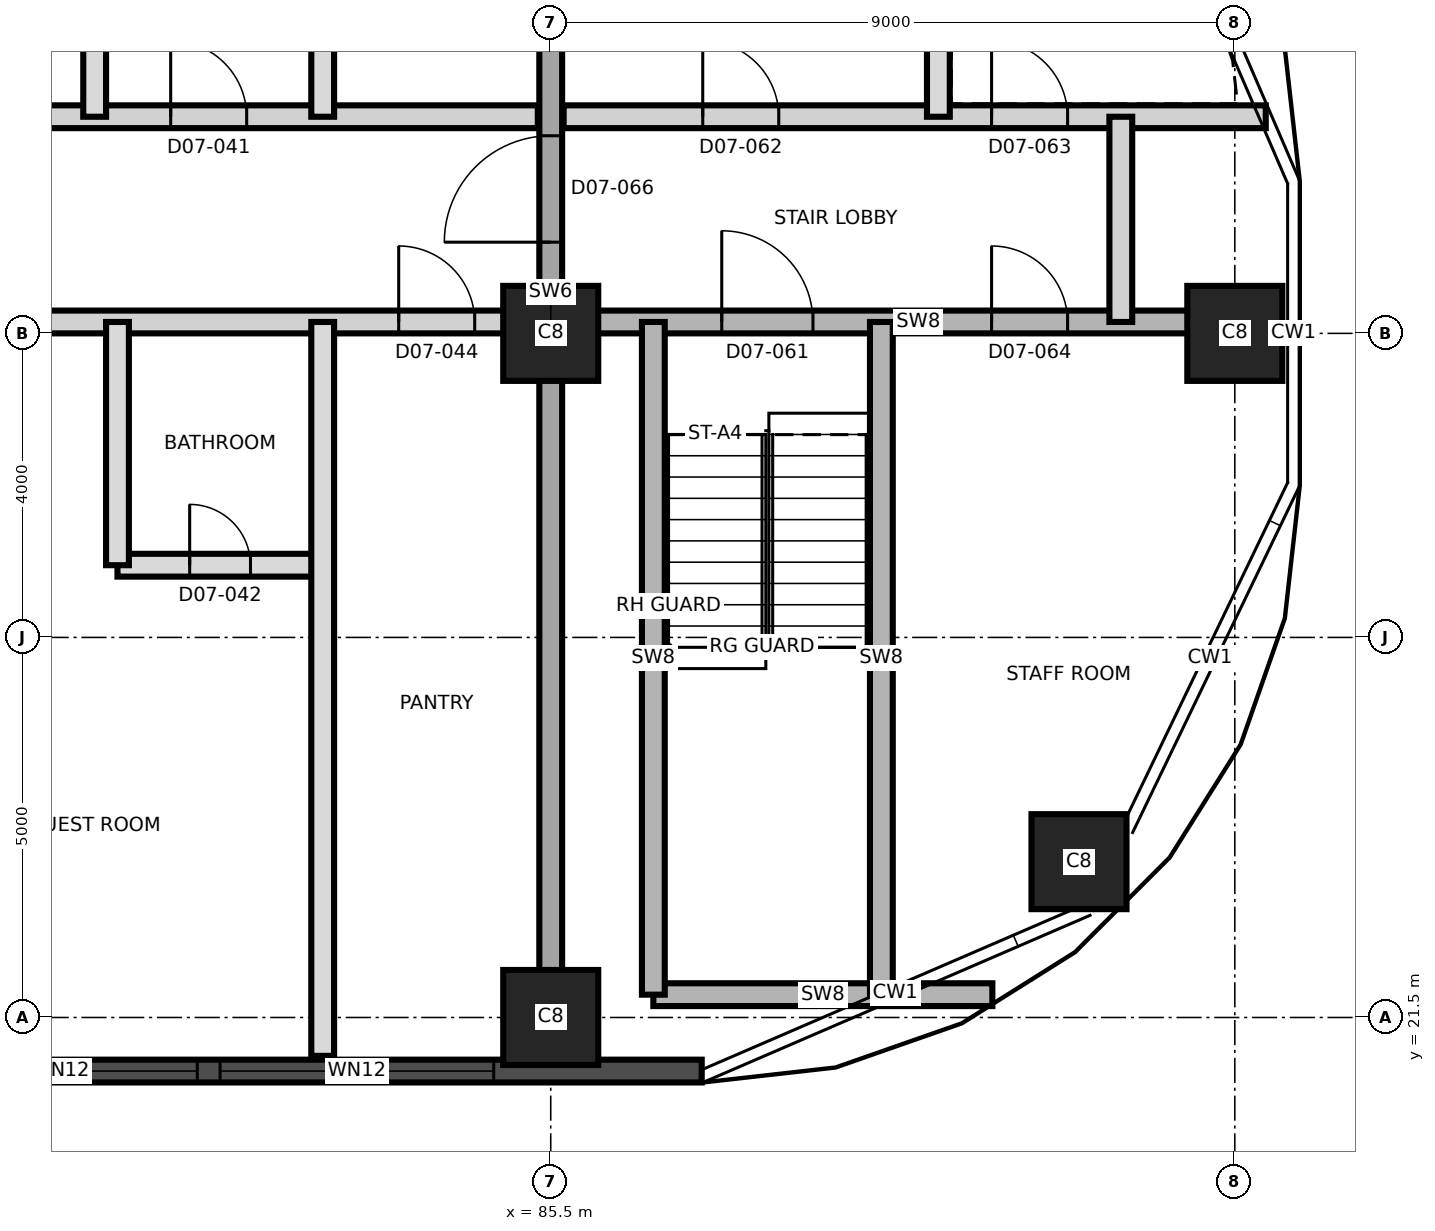
"""IFC4 building model, lengths in metres.
Left out: names, types, materials, properties, quantities, classifications, styles, units other than length and angle.
Written with IfcOpenShell. Run it as: python <this file> out.ifc"""

import sys

from ifc_helpers import new_model, si_unit, direction, frame, frame_2d, origin, origin_2d, place, context, subcontext, project, spatial, rectangle, extrude, element, fill, save


model = new_model("IFC4")
c1 = context("Model", 3, precision=1e-05, world=origin(), true_north=direction((0.0, 1.0)))
c2 = subcontext(c1, "Body", "Model", "MODEL_VIEW")
j1 = project(units=[si_unit("LENGTHUNIT", "METRE"), si_unit("PLANEANGLEUNIT", "RADIAN")], contexts=[c1])
p1 = place(None, origin())
s1 = spatial("IfcSite", under=j1, at=p1, CompositionType="ELEMENT")
p2 = place(p1, origin())
s2 = spatial("IfcBuilding", under=s1, at=p2, CompositionType="ELEMENT")
p3 = place(p2, frame((0.0, 0.0, 90.8)))
s3 = spatial("IfcBuildingStorey", under=s2, at=p3, CompositionType="ELEMENT", Elevation=90.8)
for number, where, z_axis, x_axis in (
    (1, (85.5, 21.5, 0.0), (0.0, 0.0, 1.0), (1.0, 0.0, 0.0)),
    (2, (92.45, 23.55, 0.0), (0.0, 0.0, 1.0), (1.0, 0.0, 0.0)),
    (3, (85.5, 30.5, 0.0), (0.0, 0.0, 1.0), (1.0, 0.0, 0.0)),
    (4, (94.5, 30.5, 0.0), (0.0, 0.0, 1.0), (1.0, 0.0, 0.0)),
):
    element("IfcColumn", number, at=place(p3, frame(where, z_axis=z_axis, x_axis=x_axis)), inside=s3, PredefinedType="COLUMN", context=c2, shape_type="SweptSolid", body=[
        extrude(rectangle(XDim=1.25, YDim=1.25, at=origin_2d()), origin(), (0.0, 0.0, 1.0), 3.7),
    ])
p4 = place(p3, frame((85.5, 20.995, 0.0), z_axis=(0.0, 0.0, 1.0), x_axis=(0.0, 1.0, 0.0)))
e5 = element("IfcWall", 5, at=p4, inside=s3, PredefinedType="SHEAR", context=c2, shape_type="SweptSolid", body=[
    extrude(rectangle(XDim=19.01, YDim=0.3, at=frame_2d((9.505, 0.0))), origin(), (0.0, 0.0, 1.0), 3.7),
])
p5 = place(p4, frame((10.705, 0.0, 0.0)))
e6 = element("IfcOpeningElement", 6, at=p5, cuts=e5, PredefinedType="OPENING", context=c2, shape_type="SweptSolid", body=[
    extrude(rectangle(XDim=1.4, YDim=2.1, at=frame_2d((0.7, 1.05))), frame((0.0, 0.16, 0.0), z_axis=(0.0, -1.0, 0.0), x_axis=(1.0, 0.0, 0.0)), (0.0, 0.0, 1.0), 0.32),
])
p6 = place(p3, frame((44.011, 20.795, 0.0), z_axis=(0.0, 0.0, 1.0), x_axis=(1.0, 0.0, 0.0)))
e7 = element("IfcWall", 7, at=p6, inside=s3, PredefinedType="SOLIDWALL", context=c2, shape_type="SweptSolid", body=[
    extrude(rectangle(XDim=43.476, YDim=0.3, at=frame_2d((21.738, 0.0))), origin(), (0.0, 0.0, 1.0), 3.4),
])
p7 = place(p6, frame((1.845, 0.0, 0.3)))
e8 = element("IfcOpeningElement", 8, at=p7, cuts=e7, PredefinedType="OPENING", context=c2, shape_type="SweptSolid", body=[
    extrude(rectangle(XDim=1.8, YDim=2.4, at=frame_2d((0.9, 1.2))), frame((0.0, 0.16, 0.0), z_axis=(0.0, -1.0, 0.0), x_axis=(1.0, 0.0, 0.0)), (0.0, 0.0, 1.0), 0.32),
])
p8 = place(p6, frame((5.639, 0.0, 0.9)))
e9 = element("IfcOpeningElement", 9, at=p8, cuts=e7, PredefinedType="OPENING", context=c2, shape_type="SweptSolid", body=[
    extrude(rectangle(XDim=4.2, YDim=1.5, at=frame_2d((2.1, 0.75))), frame((0.0, 0.16, 0.0), z_axis=(0.0, -1.0, 0.0), x_axis=(1.0, 0.0, 0.0)), (0.0, 0.0, 1.0), 0.32),
])
p9 = place(p6, frame((10.139, 0.0, 0.9)))
e10 = element("IfcOpeningElement", 10, at=p9, cuts=e7, PredefinedType="OPENING", context=c2, shape_type="SweptSolid", body=[
    extrude(rectangle(XDim=4.2, YDim=1.5, at=frame_2d((2.1, 0.75))), frame((0.0, 0.16, 0.0), z_axis=(0.0, -1.0, 0.0), x_axis=(1.0, 0.0, 0.0)), (0.0, 0.0, 1.0), 0.32),
])
p10 = place(p6, frame((14.639, 0.0, 0.9)))
e11 = element("IfcOpeningElement", 11, at=p10, cuts=e7, PredefinedType="OPENING", context=c2, shape_type="SweptSolid", body=[
    extrude(rectangle(XDim=4.2, YDim=1.5, at=frame_2d((2.1, 0.75))), frame((0.0, 0.16, 0.0), z_axis=(0.0, -1.0, 0.0), x_axis=(1.0, 0.0, 0.0)), (0.0, 0.0, 1.0), 0.32),
])
p11 = place(p6, frame((19.139, 0.0, 0.9)))
e12 = element("IfcOpeningElement", 12, at=p11, cuts=e7, PredefinedType="OPENING", context=c2, shape_type="SweptSolid", body=[
    extrude(rectangle(XDim=3.6, YDim=1.5, at=frame_2d((1.8, 0.75))), frame((0.0, 0.16, 0.0), z_axis=(0.0, -1.0, 0.0), x_axis=(1.0, 0.0, 0.0)), (0.0, 0.0, 1.0), 0.32),
])
p12 = place(p6, frame((24.239, 0.0, 0.9)))
e13 = element("IfcOpeningElement", 13, at=p12, cuts=e7, PredefinedType="OPENING", context=c2, shape_type="SweptSolid", body=[
    extrude(rectangle(XDim=3.6, YDim=1.5, at=frame_2d((1.8, 0.75))), frame((0.0, 0.16, 0.0), z_axis=(0.0, -1.0, 0.0), x_axis=(1.0, 0.0, 0.0)), (0.0, 0.0, 1.0), 0.32),
])
p13 = place(p6, frame((28.139, 0.0, 0.9)))
e14 = element("IfcOpeningElement", 14, at=p13, cuts=e7, PredefinedType="OPENING", context=c2, shape_type="SweptSolid", body=[
    extrude(rectangle(XDim=3.6, YDim=1.5, at=frame_2d((1.8, 0.75))), frame((0.0, 0.16, 0.0), z_axis=(0.0, -1.0, 0.0), x_axis=(1.0, 0.0, 0.0)), (0.0, 0.0, 1.0), 0.32),
])
p14 = place(p6, frame((33.239, 0.0, 0.9)))
e15 = element("IfcOpeningElement", 15, at=p14, cuts=e7, PredefinedType="OPENING", context=c2, shape_type="SweptSolid", body=[
    extrude(rectangle(XDim=3.6, YDim=1.5, at=frame_2d((1.8, 0.75))), frame((0.0, 0.16, 0.0), z_axis=(0.0, -1.0, 0.0), x_axis=(1.0, 0.0, 0.0)), (0.0, 0.0, 1.0), 0.32),
])
p15 = place(p6, frame((37.139, 0.0, 0.9)))
e16 = element("IfcOpeningElement", 16, at=p15, cuts=e7, PredefinedType="OPENING", context=c2, shape_type="SweptSolid", body=[
    extrude(rectangle(XDim=3.6, YDim=1.5, at=frame_2d((1.8, 0.75))), frame((0.0, 0.16, 0.0), z_axis=(0.0, -1.0, 0.0), x_axis=(1.0, 0.0, 0.0)), (0.0, 0.0, 1.0), 0.32),
])
p16 = place(p3, frame((86.85, 21.8, 0.0), z_axis=(0.0, 0.0, 1.0), x_axis=(1.0, 0.0, 0.0)))
e17 = element("IfcWall", 17, at=p16, inside=s3, PredefinedType="SHEAR", context=c2, shape_type="SweptSolid", body=[
    extrude(rectangle(XDim=4.46, YDim=0.3, at=frame_2d((2.23, 0.0))), origin(), (0.0, 0.0, 1.0), 3.4),
])
p17 = place(p3, frame((79.8, 27.45, 0.0), z_axis=(0.0, 0.0, 1.0), x_axis=(1.0, 0.0, 0.0)))
e18 = element("IfcWall", 18, at=p17, inside=s3, PredefinedType="PARTITIONING", context=c2, shape_type="SweptSolid", body=[
    extrude(rectangle(XDim=2.7, YDim=0.3, at=frame_2d((1.35, 0.0))), origin(), (0.0, 0.0, 1.0), 3.4),
])
p18 = place(p17, frame((0.95, 0.0, 0.0)))
e19 = element("IfcOpeningElement", 19, at=p18, cuts=e18, PredefinedType="OPENING", context=c2, shape_type="SweptSolid", body=[
    extrude(rectangle(XDim=0.8, YDim=2.1, at=frame_2d((0.4, 1.05))), frame((0.0, 0.16, 0.0), z_axis=(0.0, -1.0, 0.0), x_axis=(1.0, 0.0, 0.0)), (0.0, 0.0, 1.0), 0.32),
])
p19 = place(p3, frame((58.8, 30.65, 0.0), z_axis=(0.0, 0.0, 1.0), x_axis=(1.0, 0.0, 0.0)))
e20 = element("IfcWall", 20, at=p19, inside=s3, PredefinedType="PARTITIONING", context=c2, shape_type="SweptSolid", body=[
    extrude(rectangle(XDim=26.53, YDim=0.3, at=frame_2d((13.265, 0.0))), origin(), (0.0, 0.0, 1.0), 3.4),
])
p20 = place(p19, frame((3.7, 0.0, 0.0)))
e21 = element("IfcOpeningElement", 21, at=p20, cuts=e20, PredefinedType="OPENING", context=c2, shape_type="SweptSolid", body=[
    extrude(rectangle(XDim=1.0, YDim=2.4, at=frame_2d((0.5, 1.2))), frame((0.0, 0.16, 0.0), z_axis=(0.0, -1.0, 0.0), x_axis=(1.0, 0.0, 0.0)), (0.0, 0.0, 1.0), 0.32),
])
p21 = place(p19, frame((11.8, 0.0, 0.0)))
e22 = element("IfcOpeningElement", 22, at=p21, cuts=e20, PredefinedType="OPENING", context=c2, shape_type="SweptSolid", body=[
    extrude(rectangle(XDim=1.0, YDim=2.1, at=frame_2d((0.5, 1.05))), frame((0.0, 0.16, 0.0), z_axis=(0.0, -1.0, 0.0), x_axis=(1.0, 0.0, 0.0)), (0.0, 0.0, 1.0), 0.32),
])
p22 = place(p19, frame((13.6, 0.0, 0.0)))
e23 = element("IfcOpeningElement", 23, at=p22, cuts=e20, PredefinedType="OPENING", context=c2, shape_type="SweptSolid", body=[
    extrude(rectangle(XDim=1.0, YDim=2.1, at=frame_2d((0.5, 1.05))), frame((0.0, 0.16, 0.0), z_axis=(0.0, -1.0, 0.0), x_axis=(1.0, 0.0, 0.0)), (0.0, 0.0, 1.0), 0.32),
])
p23 = place(p19, frame((18.85, 0.0, 0.0)))
e24 = element("IfcOpeningElement", 24, at=p23, cuts=e20, PredefinedType="OPENING", context=c2, shape_type="SweptSolid", body=[
    extrude(rectangle(XDim=1.0, YDim=2.1, at=frame_2d((0.5, 1.05))), frame((0.0, 0.16, 0.0), z_axis=(0.0, -1.0, 0.0), x_axis=(1.0, 0.0, 0.0)), (0.0, 0.0, 1.0), 0.32),
])
p24 = place(p19, frame((24.7, 0.0, 0.0)))
e25 = element("IfcOpeningElement", 25, at=p24, cuts=e20, PredefinedType="OPENING", context=c2, shape_type="SweptSolid", body=[
    extrude(rectangle(XDim=1.0, YDim=2.1, at=frame_2d((0.5, 1.05))), frame((0.0, 0.16, 0.0), z_axis=(0.0, -1.0, 0.0), x_axis=(1.0, 0.0, 0.0)), (0.0, 0.0, 1.0), 0.32),
])
p25 = place(p3, frame((85.67, 30.65, 0.0), z_axis=(0.0, 0.0, 1.0), x_axis=(1.0, 0.0, 0.0)))
e26 = element("IfcWall", 26, at=p25, inside=s3, PredefinedType="SHEAR", context=c2, shape_type="SweptSolid", body=[
    extrude(rectangle(XDim=9.335, YDim=0.3, at=frame_2d((4.667, 0.0))), origin(), (0.0, 0.0, 1.0), 3.4),
])
p26 = place(p25, frame((2.08, 0.0, 0.0)))
e27 = element("IfcOpeningElement", 27, at=p26, cuts=e26, PredefinedType="OPENING", context=c2, shape_type="SweptSolid", body=[
    extrude(rectangle(XDim=1.2, YDim=2.1, at=frame_2d((0.6, 1.05))), frame((0.0, 0.16, 0.0), z_axis=(0.0, -1.0, 0.0), x_axis=(1.0, 0.0, 0.0)), (0.0, 0.0, 1.0), 0.32),
])
p27 = place(p25, frame((5.63, 0.0, 0.0)))
e28 = element("IfcOpeningElement", 28, at=p27, cuts=e26, PredefinedType="OPENING", context=c2, shape_type="SweptSolid", body=[
    extrude(rectangle(XDim=1.0, YDim=2.1, at=frame_2d((0.5, 1.05))), frame((0.0, 0.16, 0.0), z_axis=(0.0, -1.0, 0.0), x_axis=(1.0, 0.0, 0.0)), (0.0, 0.0, 1.0), 0.32),
])
p28 = place(p3, frame((58.8, 33.35, 0.0), z_axis=(0.0, 0.0, 1.0), x_axis=(1.0, 0.0, 0.0)))
e29 = element("IfcWall", 29, at=p28, inside=s3, PredefinedType="PARTITIONING", context=c2, shape_type="SweptSolid", body=[
    extrude(rectangle(XDim=26.53, YDim=0.3, at=frame_2d((13.265, 0.0))), origin(), (0.0, 0.0, 1.0), 3.4),
])
p29 = place(p28, frame((3.7, 0.0, 0.0)))
e30 = element("IfcOpeningElement", 30, at=p29, cuts=e29, PredefinedType="OPENING", context=c2, shape_type="SweptSolid", body=[
    extrude(rectangle(XDim=1.0, YDim=2.4, at=frame_2d((0.5, 1.2))), frame((0.0, 0.16, 0.0), z_axis=(0.0, -1.0, 0.0), x_axis=(1.0, 0.0, 0.0)), (0.0, 0.0, 1.0), 0.32),
])
p30 = place(p28, frame((9.85, 0.0, 0.0)))
e31 = element("IfcOpeningElement", 31, at=p30, cuts=e29, PredefinedType="OPENING", context=c2, shape_type="SweptSolid", body=[
    extrude(rectangle(XDim=1.0, YDim=2.1, at=frame_2d((0.5, 1.05))), frame((0.0, 0.16, 0.0), z_axis=(0.0, -1.0, 0.0), x_axis=(1.0, 0.0, 0.0)), (0.0, 0.0, 1.0), 0.32),
])
p31 = place(p28, frame((15.7, 0.0, 0.0)))
e32 = element("IfcOpeningElement", 32, at=p31, cuts=e29, PredefinedType="OPENING", context=c2, shape_type="SweptSolid", body=[
    extrude(rectangle(XDim=1.0, YDim=2.1, at=frame_2d((0.5, 1.05))), frame((0.0, 0.16, 0.0), z_axis=(0.0, -1.0, 0.0), x_axis=(1.0, 0.0, 0.0)), (0.0, 0.0, 1.0), 0.32),
])
p32 = place(p28, frame((21.7, 0.0, 0.0)))
e33 = element("IfcOpeningElement", 33, at=p32, cuts=e29, PredefinedType="OPENING", context=c2, shape_type="SweptSolid", body=[
    extrude(rectangle(XDim=1.0, YDim=2.4, at=frame_2d((0.5, 1.2))), frame((0.0, 0.16, 0.0), z_axis=(0.0, -1.0, 0.0), x_axis=(1.0, 0.0, 0.0)), (0.0, 0.0, 1.0), 0.32),
])
p33 = place(p3, frame((85.67, 33.35, 0.0), z_axis=(0.0, 0.0, 1.0), x_axis=(1.0, 0.0, 0.0)))
e34 = element("IfcWall", 34, at=p33, inside=s3, PredefinedType="PARTITIONING", context=c2, shape_type="SweptSolid", body=[
    extrude(rectangle(XDim=9.237, YDim=0.3, at=frame_2d((4.619, 0.0))), origin(), (0.0, 0.0, 1.0), 3.4),
])
p34 = place(p33, frame((1.83, 0.0, 0.0)))
e35 = element("IfcOpeningElement", 35, at=p34, cuts=e34, PredefinedType="OPENING", context=c2, shape_type="SweptSolid", body=[
    extrude(rectangle(XDim=1.0, YDim=2.1, at=frame_2d((0.5, 1.05))), frame((0.0, 0.16, 0.0), z_axis=(0.0, -1.0, 0.0), x_axis=(1.0, 0.0, 0.0)), (0.0, 0.0, 1.0), 0.32),
])
p35 = place(p33, frame((5.63, 0.0, 0.0)))
e36 = element("IfcOpeningElement", 36, at=p35, cuts=e34, PredefinedType="OPENING", context=c2, shape_type="SweptSolid", body=[
    extrude(rectangle(XDim=1.0, YDim=2.1, at=frame_2d((0.5, 1.05))), frame((0.0, 0.16, 0.0), z_axis=(0.0, -1.0, 0.0), x_axis=(1.0, 0.0, 0.0)), (0.0, 0.0, 1.0), 0.32),
])
p36 = place(p3, frame((79.5, 33.35, 0.0), z_axis=(0.0, 0.0, 1.0), x_axis=(0.0, 1.0, 0.0)))
e37 = element("IfcWall", 37, at=p36, inside=s3, PredefinedType="PARTITIONING", context=c2, shape_type="SweptSolid", body=[
    extrude(rectangle(XDim=3.3, YDim=0.3, at=frame_2d((1.65, 0.0))), origin(), (0.0, 0.0, 1.0), 3.4),
])
p37 = place(p3, frame((79.8, 27.45, 0.0), z_axis=(0.0, 0.0, 1.0), x_axis=(0.0, 1.0, 0.0)))
e38 = element("IfcWall", 38, at=p37, inside=s3, PredefinedType="PARTITIONING", context=c2, shape_type="SweptSolid", body=[
    extrude(rectangle(XDim=3.2, YDim=0.3, at=frame_2d((1.6, 0.0))), origin(), (0.0, 0.0, 1.0), 3.4),
])
p38 = place(p3, frame((82.5, 20.995, 0.0), z_axis=(0.0, 0.0, 1.0), x_axis=(0.0, 1.0, 0.0)))
e39 = element("IfcWall", 39, at=p38, inside=s3, PredefinedType="PARTITIONING", context=c2, shape_type="SweptSolid", body=[
    extrude(rectangle(XDim=9.655, YDim=0.3, at=frame_2d((4.827, 0.0))), origin(), (0.0, 0.0, 1.0), 3.4),
])
p39 = place(p3, frame((82.5, 33.35, 0.0), z_axis=(0.0, 0.0, 1.0), x_axis=(0.0, 1.0, 0.0)))
e40 = element("IfcWall", 40, at=p39, inside=s3, PredefinedType="PARTITIONING", context=c2, shape_type="SweptSolid", body=[
    extrude(rectangle(XDim=3.3, YDim=0.3, at=frame_2d((1.65, 0.0))), origin(), (0.0, 0.0, 1.0), 3.4),
])
for number, where, z_axis, x_axis in (
    (41, (86.85, 21.8, 0.0), (0.0, 0.0, 1.0), (0.0, 1.0, 0.0)),
    (42, (89.85, 21.8, 0.0), (0.0, 0.0, 1.0), (0.0, 1.0, 0.0)),
):
    element("IfcWall", number, at=place(p3, frame(where, z_axis=z_axis, x_axis=x_axis)), inside=s3, PredefinedType="SHEAR", context=c2, shape_type="SweptSolid", body=[
        extrude(rectangle(XDim=8.85, YDim=0.3, at=frame_2d((4.425, 0.0))), origin(), (0.0, 0.0, 1.0), 3.4),
    ])
p40 = place(p3, frame((90.6, 33.35, 0.0), z_axis=(0.0, 0.0, 1.0), x_axis=(0.0, 1.0, 0.0)))
e43 = element("IfcWall", 43, at=p40, inside=s3, PredefinedType="PARTITIONING", context=c2, shape_type="SweptSolid", body=[
    extrude(rectangle(XDim=6.219, YDim=0.3, at=frame_2d((3.109, 0.0))), origin(), (0.0, 0.0, 1.0), 3.4),
])
p41 = place(p3, frame((93.0, 30.65, 0.0), z_axis=(0.0, 0.0, 1.0), x_axis=(0.0, 1.0, 0.0)))
e44 = element("IfcWall", 44, at=p41, inside=s3, PredefinedType="PARTITIONING", context=c2, shape_type="SweptSolid", body=[
    extrude(rectangle(XDim=2.7, YDim=0.3, at=frame_2d((1.35, 0.0))), origin(), (0.0, 0.0, 1.0), 3.4),
])
p42 = place(p14, origin())
e45 = element("IfcWindow", 45, at=p42, inside=s3, PartitioningType="SINGLE_PANEL", PredefinedType="WINDOW", context=c2, shape_type="SweptSolid", body=[
    extrude(rectangle(XDim=3.6, YDim=1.5, at=frame_2d((1.8, 0.75))), frame((0.0, 0.03, 0.0), z_axis=(0.0, -1.0, 0.0), x_axis=(1.0, 0.0, 0.0)), (0.0, 0.0, 1.0), 0.06),
])
fill(e15, e45)
p43 = place(p15, origin())
e46 = element("IfcWindow", 46, at=p43, inside=s3, PartitioningType="SINGLE_PANEL", PredefinedType="WINDOW", context=c2, shape_type="SweptSolid", body=[
    extrude(rectangle(XDim=3.6, YDim=1.5, at=frame_2d((1.8, 0.75))), frame((0.0, 0.03, 0.0), z_axis=(0.0, -1.0, 0.0), x_axis=(1.0, 0.0, 0.0)), (0.0, 0.0, 1.0), 0.06),
])
fill(e16, e46)
p44 = place(p32, origin())
e47 = element("IfcDoor", 47, at=p44, inside=s3, OperationType="SINGLE_SWING_LEFT", PredefinedType="DOOR", context=c2, shape_type="SweptSolid", body=[
    extrude(rectangle(XDim=1.0, YDim=2.4, at=frame_2d((0.5, 1.2))), frame((0.0, 0.025, 0.0), z_axis=(0.0, -1.0, 0.0), x_axis=(1.0, 0.0, 0.0)), (0.0, 0.0, 1.0), 0.05),
])
fill(e33, e47)
p45 = place(p18, origin())
e48 = element("IfcDoor", 48, at=p45, inside=s3, OperationType="SINGLE_SWING_RIGHT", PredefinedType="DOOR", context=c2, shape_type="SweptSolid", body=[
    extrude(rectangle(XDim=0.8, YDim=2.1, at=frame_2d((0.4, 1.05))), frame((0.0, 0.025, 0.0), z_axis=(0.0, -1.0, 0.0), x_axis=(1.0, 0.0, 0.0)), (0.0, 0.0, 1.0), 0.05),
])
fill(e19, e48)
p46 = place(p24, origin())
e49 = element("IfcDoor", 49, at=p46, inside=s3, OperationType="SINGLE_SWING_LEFT", PredefinedType="DOOR", context=c2, shape_type="SweptSolid", body=[
    extrude(rectangle(XDim=1.0, YDim=2.1, at=frame_2d((0.5, 1.05))), frame((0.0, 0.025, 0.0), z_axis=(0.0, -1.0, 0.0), x_axis=(1.0, 0.0, 0.0)), (0.0, 0.0, 1.0), 0.05),
])
fill(e25, e49)
p47 = place(p26, origin())
e50 = element("IfcDoor", 50, at=p47, inside=s3, OperationType="SINGLE_SWING_LEFT", PredefinedType="DOOR", context=c2, shape_type="SweptSolid", body=[
    extrude(rectangle(XDim=1.2, YDim=2.1, at=frame_2d((0.6, 1.05))), frame((0.0, 0.025, 0.0), z_axis=(0.0, -1.0, 0.0), x_axis=(1.0, 0.0, 0.0)), (0.0, 0.0, 1.0), 0.05),
])
fill(e27, e50)
p48 = place(p34, origin())
e51 = element("IfcDoor", 51, at=p48, inside=s3, OperationType="SINGLE_SWING_LEFT", PredefinedType="DOOR", context=c2, shape_type="SweptSolid", body=[
    extrude(rectangle(XDim=1.0, YDim=2.1, at=frame_2d((0.5, 1.05))), frame((0.0, 0.025, 0.0), z_axis=(0.0, -1.0, 0.0), x_axis=(1.0, 0.0, 0.0)), (0.0, 0.0, 1.0), 0.05),
])
fill(e35, e51)
p49 = place(p35, origin())
e52 = element("IfcDoor", 52, at=p49, inside=s3, OperationType="SINGLE_SWING_RIGHT", PredefinedType="DOOR", context=c2, shape_type="SweptSolid", body=[
    extrude(rectangle(XDim=1.0, YDim=2.1, at=frame_2d((0.5, 1.05))), frame((0.0, 0.025, 0.0), z_axis=(0.0, -1.0, 0.0), x_axis=(1.0, 0.0, 0.0)), (0.0, 0.0, 1.0), 0.05),
])
fill(e36, e52)
p50 = place(p27, origin())
e53 = element("IfcDoor", 53, at=p50, inside=s3, OperationType="SINGLE_SWING_LEFT", PredefinedType="DOOR", context=c2, shape_type="SweptSolid", body=[
    extrude(rectangle(XDim=1.0, YDim=2.1, at=frame_2d((0.5, 1.05))), frame((0.0, 0.025, 0.0), z_axis=(0.0, -1.0, 0.0), x_axis=(1.0, 0.0, 0.0)), (0.0, 0.0, 1.0), 0.05),
])
fill(e28, e53)
p51 = place(p5, origin())
e54 = element("IfcDoor", 54, at=p51, inside=s3, OperationType="SINGLE_SWING_RIGHT", PredefinedType="DOOR", context=c2, shape_type="SweptSolid", body=[
    extrude(rectangle(XDim=1.4, YDim=2.1, at=frame_2d((0.7, 1.05))), frame((0.0, 0.025, 0.0), z_axis=(0.0, -1.0, 0.0), x_axis=(1.0, 0.0, 0.0)), (0.0, 0.0, 1.0), 0.05),
])
fill(e6, e54)
save(model, sys.argv[1])
